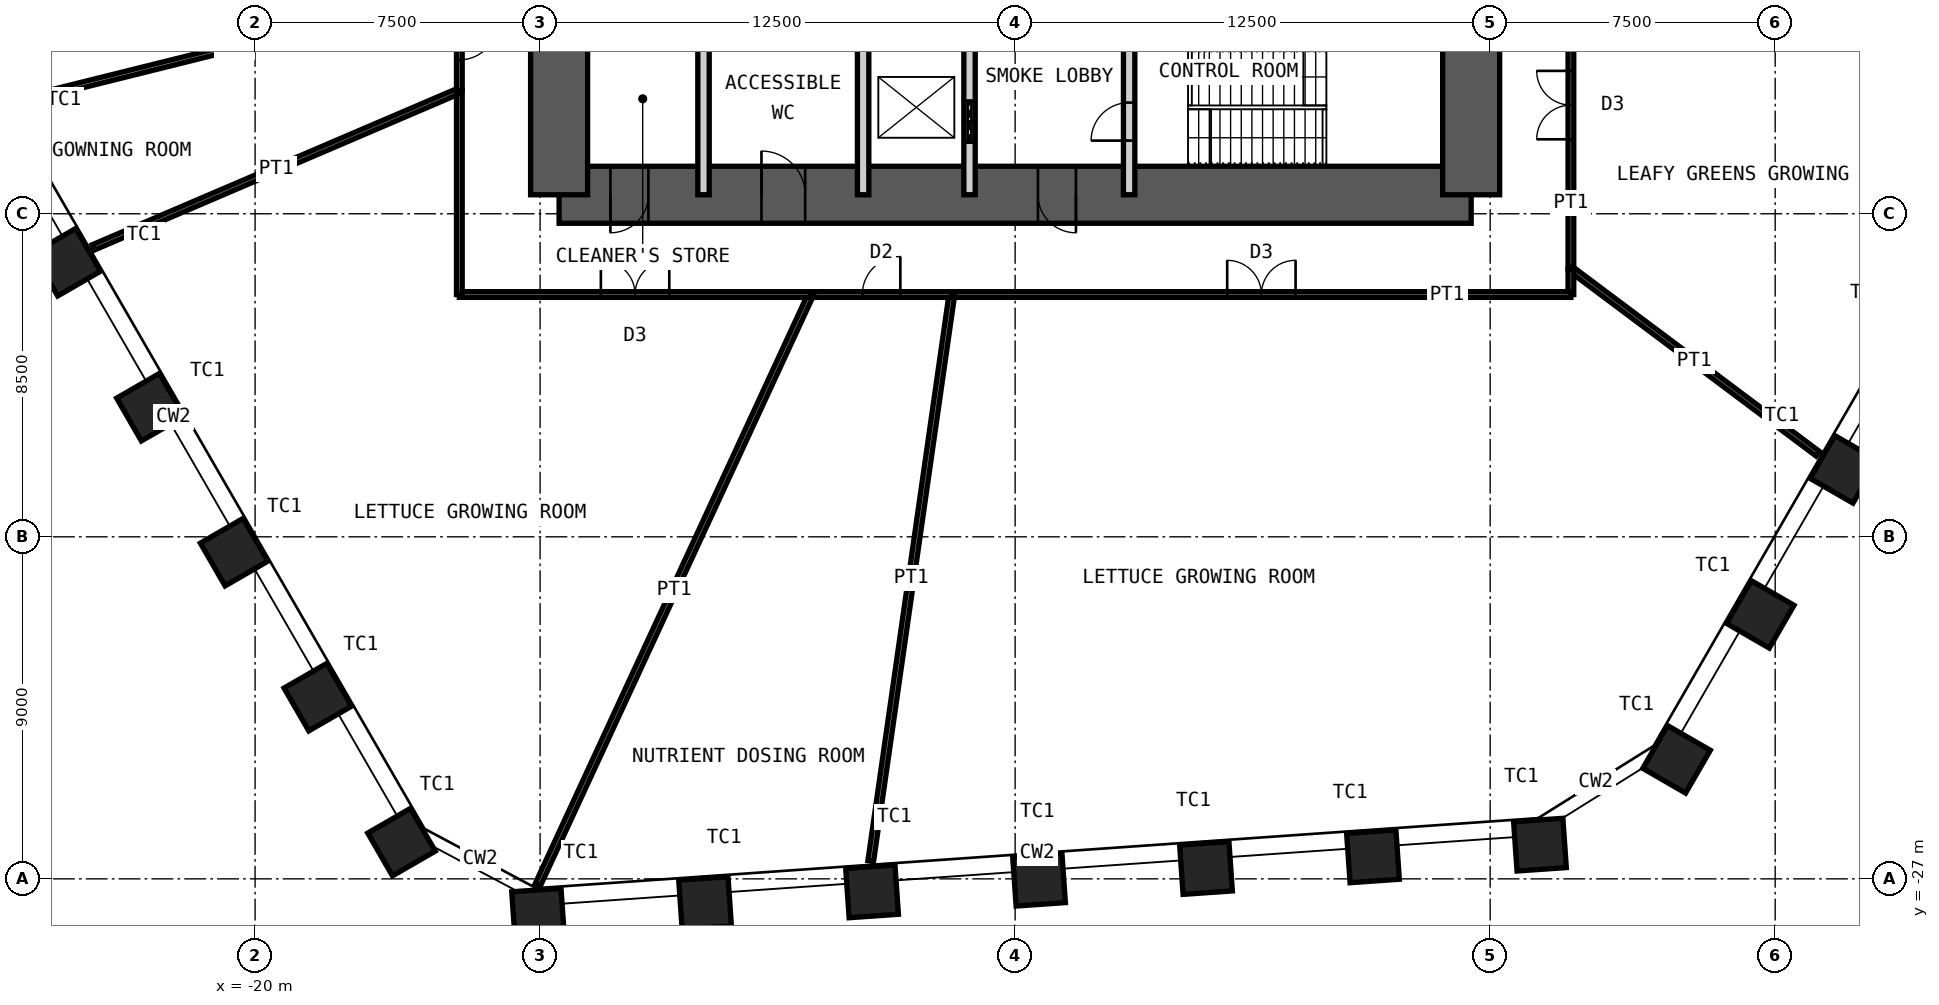
"""IFC4 building model, lengths in metres.
Left out: names, types, materials, properties, quantities, classifications, styles, units other than length and angle.
Written with IfcOpenShell. Run it as: python <this file> out.ifc"""

import sys

from ifc_helpers import new_model, si_unit, direction, frame, frame_2d, origin, origin_2d, place, context, subcontext, project, spatial, rectangle, hollow_rectangle, extrude, element, fill, save


model = new_model("IFC4")
c1 = context("Model", 3, precision=1e-05, world=origin(), true_north=direction((0.0, 1.0)))
c2 = subcontext(c1, "Body", "Model", "MODEL_VIEW")
j1 = project(units=[si_unit("LENGTHUNIT", "METRE"), si_unit("PLANEANGLEUNIT", "RADIAN")], contexts=[c1])
p1 = place(None, origin())
s1 = spatial("IfcSite", under=j1, at=p1, CompositionType="ELEMENT")
p2 = place(p1, origin())
s2 = spatial("IfcBuilding", under=s1, at=p2, CompositionType="ELEMENT")
p3 = place(p2, frame((0.0, 0.0, 42.0)))
s3 = spatial("IfcBuildingStorey", under=s2, at=p3, CompositionType="ELEMENT", Elevation=42.0)
for number, where, z_axis, x_axis in (
    (1, (21.809, -16.225, 0.0), (0.0, 0.0, 1.0), (0.5, 0.866, 0.0)),
    (2, (19.607, -20.04, 0.0), (0.0, 0.0, 1.0), (0.5, 0.866, 0.0)),
    (3, (17.405, -23.854, 0.0), (0.0, 0.0, 1.0), (0.5, 0.866, 0.0)),
    (4, (13.811, -26.1, 0.0), (0.0, 0.0, 1.0), (0.998, 0.07, 0.0)),
    (5, (9.417, -26.407, 0.0), (0.0, 0.0, 1.0), (0.998, 0.07, 0.0)),
    (6, (5.023, -26.715, 0.0), (0.0, 0.0, 1.0), (0.998, 0.07, 0.0)),
    (7, (0.629, -27.022, 0.0), (0.0, 0.0, 1.0), (0.998, 0.07, 0.0)),
    (8, (-3.765, -27.329, 0.0), (0.0, 0.0, 1.0), (0.998, 0.07, 0.0)),
    (9, (-8.159, -27.636, 0.0), (0.0, 0.0, 1.0), (0.998, 0.07, 0.0)),
    (10, (-12.553, -27.944, 0.0), (0.0, 0.0, 1.0), (0.998, 0.07, 0.0)),
    (11, (-16.147, -26.033, 0.0), (0.0, 0.0, 1.0), (0.5, -0.866, 0.0)),
    (12, (-18.349, -22.218, 0.0), (0.0, 0.0, 1.0), (0.5, -0.866, 0.0)),
    (13, (-20.552, -18.404, 0.0), (0.0, 0.0, 1.0), (0.5, -0.866, 0.0)),
    (14, (-22.754, -14.589, 0.0), (0.0, 0.0, 1.0), (0.5, -0.866, 0.0)),
    (15, (-24.956, -10.775, 0.0), (0.0, 0.0, 1.0), (0.5, -0.866, 0.0)),
):
    element("IfcColumn", number, at=place(p3, frame(where, z_axis=z_axis, x_axis=x_axis)), inside=s3, PredefinedType="COLUMN", context=c2, shape_type="SweptSolid", body=[
        extrude(hollow_rectangle(XDim=1.3, YDim=1.3, WallThickness=0.1, at=origin_2d()), origin(), (0.0, 0.0, 1.0), 5.0),
    ])
p4 = place(p3, frame((-12.0, -9.0, 0.0), z_axis=(0.0, 0.0, 1.0), x_axis=(1.0, 0.0, 0.0)))
e16 = element("IfcWall", 16, at=p4, inside=s3, PredefinedType="SHEAR", context=c2, shape_type="SweptSolid", body=[
    extrude(rectangle(XDim=24.0, YDim=1.5, at=frame_2d((12.0, 0.0))), origin(), (0.0, 0.0, 1.0), 5.0),
])
p5 = place(p4, frame((1.35, 0.0, 0.0)))
e17 = element("IfcOpeningElement", 17, at=p5, cuts=e16, PredefinedType="OPENING", context=c2, shape_type="SweptSolid", body=[
    extrude(rectangle(XDim=1.0, YDim=2.1, at=frame_2d((0.5, 1.05))), frame((0.0, 0.76, 0.0), z_axis=(0.0, -1.0, 0.0), x_axis=(1.0, 0.0, 0.0)), (0.0, 0.0, 1.0), 1.52),
])
p6 = place(p4, frame((5.325, 0.0, 0.0)))
e18 = element("IfcOpeningElement", 18, at=p6, cuts=e16, PredefinedType="OPENING", context=c2, shape_type="SweptSolid", body=[
    extrude(rectangle(XDim=1.15, YDim=2.1, at=frame_2d((0.575, 1.05))), frame((0.0, 0.76, 0.0), z_axis=(0.0, -1.0, 0.0), x_axis=(1.0, 0.0, 0.0)), (0.0, 0.0, 1.0), 1.52),
])
p7 = place(p4, frame((12.6, 0.0, 0.0)))
e19 = element("IfcOpeningElement", 19, at=p7, cuts=e16, PredefinedType="OPENING", context=c2, shape_type="SweptSolid", body=[
    extrude(rectangle(XDim=1.0, YDim=2.1, at=frame_2d((0.5, 1.05))), frame((0.0, 0.76, 0.0), z_axis=(0.0, -1.0, 0.0), x_axis=(1.0, 0.0, 0.0)), (0.0, 0.0, 1.0), 1.52),
])
p8 = place(p3, frame((12.0, -9.0, 0.0), z_axis=(0.0, 0.0, 1.0), x_axis=(0.0, 1.0, 0.0)))
e20 = element("IfcWall", 20, at=p8, inside=s3, PredefinedType="SHEAR", context=c2, shape_type="SweptSolid", body=[
    extrude(rectangle(XDim=18.0, YDim=1.5, at=frame_2d((9.0, 0.0))), origin(), (0.0, 0.0, 1.0), 5.0),
])
p9 = place(p8, frame((8.1, 0.0, 0.0)))
e21 = element("IfcOpeningElement", 21, at=p9, cuts=e20, PredefinedType="OPENING", context=c2, shape_type="SweptSolid", body=[
    extrude(rectangle(XDim=1.8, YDim=2.1, at=frame_2d((0.9, 1.05))), frame((0.0, 0.76, 0.0), z_axis=(0.0, -1.0, 0.0), x_axis=(1.0, 0.0, 0.0)), (0.0, 0.0, 1.0), 1.52),
])
p10 = place(p3, frame((-12.0, -9.0, 0.0), z_axis=(0.0, 0.0, 1.0), x_axis=(0.0, 1.0, 0.0)))
e22 = element("IfcWall", 22, at=p10, inside=s3, PredefinedType="SHEAR", context=c2, shape_type="SweptSolid", body=[
    extrude(rectangle(XDim=18.0, YDim=1.5, at=frame_2d((9.0, 0.0))), origin(), (0.0, 0.0, 1.0), 5.0),
])
p11 = place(p10, frame((8.1, 0.0, 0.0)))
e23 = element("IfcOpeningElement", 23, at=p11, cuts=e22, PredefinedType="OPENING", context=c2, shape_type="SweptSolid", body=[
    extrude(rectangle(XDim=1.8, YDim=2.1, at=frame_2d((0.9, 1.05))), frame((0.0, 0.76, 0.0), z_axis=(0.0, -1.0, 0.0), x_axis=(1.0, 0.0, 0.0)), (0.0, 0.0, 1.0), 1.52),
])
for number, where, z_axis, x_axis in (
    (24, (-8.2, -9.0, 0.0), (0.0, 0.0, 1.0), (0.0, 1.0, 0.0)),
    (25, (-4.0, -9.0, 0.0), (0.0, 0.0, 1.0), (0.0, 1.0, 0.0)),
):
    element("IfcWall", number, at=place(p3, frame(where, z_axis=z_axis, x_axis=x_axis)), inside=s3, PredefinedType="PARTITIONING", context=c2, shape_type="SweptSolid", body=[
        extrude(rectangle(XDim=3.85, YDim=0.3, at=frame_2d((1.925, 0.0))), origin(), (0.0, 0.0, 1.0), 4.78),
    ])
p12 = place(p3, frame((-1.2, -9.0, 0.0), z_axis=(0.0, 0.0, 1.0), x_axis=(0.0, 1.0, 0.0)))
e26 = element("IfcWall", 26, at=p12, inside=s3, PredefinedType="PARTITIONING", context=c2, shape_type="SweptSolid", body=[
    extrude(rectangle(XDim=3.85, YDim=0.3, at=frame_2d((1.925, 0.0))), origin(), (0.0, 0.0, 1.0), 4.78),
])
p13 = place(p12, frame((1.375, 0.0, 0.0)))
e27 = element("IfcOpeningElement", 27, at=p13, cuts=e26, PredefinedType="OPENING", context=c2, shape_type="SweptSolid", body=[
    extrude(rectangle(XDim=1.1, YDim=2.4, at=frame_2d((0.55, 1.2))), frame((0.0, 0.16, 0.0), z_axis=(0.0, -1.0, 0.0), x_axis=(1.0, 0.0, 0.0)), (0.0, 0.0, 1.0), 0.32),
])
p14 = place(p3, frame((3.0, -9.0, 0.0), z_axis=(0.0, 0.0, 1.0), x_axis=(0.0, 1.0, 0.0)))
e28 = element("IfcWall", 28, at=p14, inside=s3, PredefinedType="PARTITIONING", context=c2, shape_type="SweptSolid", body=[
    extrude(rectangle(XDim=3.85, YDim=0.3, at=frame_2d((1.925, 0.0))), origin(), (0.0, 0.0, 1.0), 4.78),
])
p15 = place(p14, frame((1.425, 0.0, 0.0)))
e29 = element("IfcOpeningElement", 29, at=p15, cuts=e28, PredefinedType="OPENING", context=c2, shape_type="SweptSolid", body=[
    extrude(rectangle(XDim=1.0, YDim=2.1, at=frame_2d((0.5, 1.05))), frame((0.0, 0.16, 0.0), z_axis=(0.0, -1.0, 0.0), x_axis=(1.0, 0.0, 0.0)), (0.0, 0.0, 1.0), 0.32),
])
p16 = place(p3, frame((14.625, -2.331, 0.0), z_axis=(0.0, 0.0, 1.0), x_axis=(0.0, -1.0, 0.0)))
e30 = element("IfcWall", 30, at=p16, inside=s3, PredefinedType="PARTITIONING", context=c2, shape_type="SweptSolid", body=[
    extrude(rectangle(XDim=8.62, YDim=0.15, at=frame_2d((4.31, 0.0))), origin(), (0.0, 0.0, 1.0), 4.8),
])
p17 = place(p16, frame((3.41, 0.0, 0.0)))
e31 = element("IfcOpeningElement", 31, at=p17, cuts=e30, PredefinedType="OPENING", context=c2, shape_type="SweptSolid", body=[
    extrude(rectangle(XDim=1.8, YDim=2.4, at=frame_2d((0.9, 1.2))), frame((0.0, 0.085, 0.0), z_axis=(0.0, -1.0, 0.0), x_axis=(1.0, 0.0, 0.0)), (0.0, 0.0, 1.0), 0.17),
])
p18 = place(p3, frame((21.123, -15.815, 0.0), z_axis=(0.0, 0.0, 1.0), x_axis=(-0.800490565123, 0.599345355492, 0.0)))
e32 = element("IfcWall", 32, at=p18, inside=s3, PredefinedType="PARTITIONING", context=c2, shape_type="SweptSolid", body=[
    extrude(rectangle(XDim=8.118, YDim=0.15, at=frame_2d((4.059, 0.0))), origin(), (0.0, 0.0, 1.0), 3.7),
])
p19 = place(p3, frame((14.625, -10.95, 0.0), z_axis=(0.0, 0.0, 1.0), x_axis=(0.0, -1.0, 0.0)))
e33 = element("IfcWall", 33, at=p19, inside=s3, PredefinedType="PARTITIONING", context=c2, shape_type="SweptSolid", body=[
    extrude(rectangle(XDim=0.675, YDim=0.15, at=frame_2d((0.337, 0.0))), origin(), (0.0, 0.0, 1.0), 4.8),
])
p20 = place(p3, frame((14.625, -11.625, 0.0), z_axis=(0.0, 0.0, 1.0), x_axis=(-1.0, 0.0, 0.0)))
e34 = element("IfcWall", 34, at=p20, inside=s3, PredefinedType="PARTITIONING", context=c2, shape_type="SweptSolid", body=[
    extrude(rectangle(XDim=16.29, YDim=0.15, at=frame_2d((8.145, 0.0))), origin(), (0.0, 0.0, 1.0), 4.8),
])
p21 = place(p20, frame((7.245, 0.0, 0.0)))
e35 = element("IfcOpeningElement", 35, at=p21, cuts=e34, PredefinedType="OPENING", context=c2, shape_type="SweptSolid", body=[
    extrude(rectangle(XDim=1.8, YDim=2.4, at=frame_2d((0.9, 1.2))), frame((0.0, 0.085, 0.0), z_axis=(0.0, -1.0, 0.0), x_axis=(1.0, 0.0, 0.0)), (0.0, 0.0, 1.0), 0.17),
])
p22 = place(p3, frame((-3.8, -26.532, 0.0), z_axis=(0.0, 0.0, 1.0), x_axis=(0.14177542097, 0.989898848372, 0.0)))
e36 = element("IfcWall", 36, at=p22, inside=s3, PredefinedType="PARTITIONING", context=c2, shape_type="SweptSolid", body=[
    extrude(rectangle(XDim=15.059, YDim=0.15, at=frame_2d((7.53, 0.0))), origin(), (0.0, 0.0, 1.0), 3.7),
])
p23 = place(p3, frame((-1.665, -11.625, 0.0), z_axis=(0.0, 0.0, 1.0), x_axis=(-1.0, 0.0, 0.0)))
e37 = element("IfcWall", 37, at=p23, inside=s3, PredefinedType="PARTITIONING", context=c2, shape_type="SweptSolid", body=[
    extrude(rectangle(XDim=3.712, YDim=0.15, at=frame_2d((1.856, 0.0))), origin(), (0.0, 0.0, 1.0), 4.8),
])
p24 = place(p23, frame((1.356, 0.0, 0.0)))
e38 = element("IfcOpeningElement", 38, at=p24, cuts=e37, PredefinedType="OPENING", context=c2, shape_type="SweptSolid", body=[
    extrude(rectangle(XDim=1.0, YDim=2.4, at=frame_2d((0.5, 1.2))), frame((0.0, 0.085, 0.0), z_axis=(0.0, -1.0, 0.0), x_axis=(1.0, 0.0, 0.0)), (0.0, 0.0, 1.0), 0.17),
])
p25 = place(p3, frame((-12.56, -27.155, 0.0), z_axis=(0.0, 0.0, 1.0), x_axis=(0.419799104875, 0.907617051154, 0.0)))
e39 = element("IfcWall", 39, at=p25, inside=s3, PredefinedType="PARTITIONING", context=c2, shape_type="SweptSolid", body=[
    extrude(rectangle(XDim=17.11, YDim=0.15, at=frame_2d((8.555, 0.0))), origin(), (0.0, 0.0, 1.0), 3.7),
])
p26 = place(p3, frame((-5.377, -11.625, 0.0), z_axis=(0.0, 0.0, 1.0), x_axis=(-1.0, 0.0, 0.0)))
e40 = element("IfcWall", 40, at=p26, inside=s3, PredefinedType="PARTITIONING", context=c2, shape_type="SweptSolid", body=[
    extrude(rectangle(XDim=9.248, YDim=0.15, at=frame_2d((4.624, 0.0))), origin(), (0.0, 0.0, 1.0), 4.8),
])
p27 = place(p26, frame((3.724, 0.0, 0.0)))
e41 = element("IfcOpeningElement", 41, at=p27, cuts=e40, PredefinedType="OPENING", context=c2, shape_type="SweptSolid", body=[
    extrude(rectangle(XDim=1.8, YDim=2.4, at=frame_2d((0.9, 1.2))), frame((0.0, 0.085, 0.0), z_axis=(0.0, -1.0, 0.0), x_axis=(1.0, 0.0, 0.0)), (0.0, 0.0, 1.0), 0.17),
])
p28 = place(p3, frame((-14.625, -11.625, 0.0), z_axis=(0.0, 0.0, 1.0), x_axis=(0.0, 1.0, 0.0)))
e42 = element("IfcWall", 42, at=p28, inside=s3, PredefinedType="PARTITIONING", context=c2, shape_type="SweptSolid", body=[
    extrude(rectangle(XDim=5.364, YDim=0.15, at=frame_2d((2.682, 0.0))), origin(), (0.0, 0.0, 1.0), 4.8),
])
p29 = place(p3, frame((-24.258, -10.385, 0.0), z_axis=(0.0, 0.0, 1.0), x_axis=(0.919298009201, 0.393562155547, 0.0)))
e43 = element("IfcWall", 43, at=p29, inside=s3, PredefinedType="PARTITIONING", context=c2, shape_type="SweptSolid", body=[
    extrude(rectangle(XDim=10.479, YDim=0.15, at=frame_2d((5.239, 0.0))), origin(), (0.0, 0.0, 1.0), 3.7),
])
p30 = place(p3, frame((-14.625, -6.261, 0.0), z_axis=(0.0, 0.0, 1.0), x_axis=(0.0, 1.0, 0.0)))
e44 = element("IfcWall", 44, at=p30, inside=s3, PredefinedType="PARTITIONING", context=c2, shape_type="SweptSolid", body=[
    extrude(rectangle(XDim=2.62, YDim=0.15, at=frame_2d((1.31, 0.0))), origin(), (0.0, 0.0, 1.0), 4.8),
])
p31 = place(p30, frame((0.81, 0.0, 0.0)))
e45 = element("IfcOpeningElement", 45, at=p31, cuts=e44, PredefinedType="OPENING", context=c2, shape_type="SweptSolid", body=[
    extrude(rectangle(XDim=1.0, YDim=2.4, at=frame_2d((0.5, 1.2))), frame((0.0, 0.085, 0.0), z_axis=(0.0, -1.0, 0.0), x_axis=(1.0, 0.0, 0.0)), (0.0, 0.0, 1.0), 0.17),
])
p32 = place(p3, frame((-26.455, -6.586, 0.0), z_axis=(0.0, 0.0, 1.0), x_axis=(0.970383505188, 0.241569561118, 0.0)))
e46 = element("IfcWall", 46, at=p32, inside=s3, PredefinedType="PARTITIONING", context=c2, shape_type="SweptSolid", body=[
    extrude(rectangle(XDim=12.191, YDim=0.15, at=frame_2d((6.096, 0.0))), origin(), (0.0, 0.0, 1.0), 3.7),
])
p33 = place(p5, origin())
e47 = element("IfcDoor", 47, at=p33, inside=s3, OperationType="SINGLE_SWING_LEFT", PredefinedType="DOOR", context=c2, shape_type="SweptSolid", body=[
    extrude(rectangle(XDim=1.0, YDim=2.1, at=frame_2d((0.5, 1.05))), frame((0.0, 0.025, 0.0), z_axis=(0.0, -1.0, 0.0), x_axis=(1.0, 0.0, 0.0)), (0.0, 0.0, 1.0), 0.05),
])
fill(e17, e47)
p34 = place(p6, origin())
e48 = element("IfcDoor", 48, at=p34, inside=s3, OperationType="SINGLE_SWING_RIGHT", PredefinedType="DOOR", context=c2, shape_type="SweptSolid", body=[
    extrude(rectangle(XDim=1.15, YDim=2.1, at=frame_2d((0.575, 1.05))), frame((0.0, 0.025, 0.0), z_axis=(0.0, -1.0, 0.0), x_axis=(1.0, 0.0, 0.0)), (0.0, 0.0, 1.0), 0.05),
])
fill(e18, e48)
p35 = place(p7, origin())
e49 = element("IfcDoor", 49, at=p35, inside=s3, OperationType="SINGLE_SWING_RIGHT", PredefinedType="DOOR", context=c2, shape_type="SweptSolid", body=[
    extrude(rectangle(XDim=1.0, YDim=2.1, at=frame_2d((0.5, 1.05))), frame((0.0, 0.025, 0.0), z_axis=(0.0, -1.0, 0.0), x_axis=(1.0, 0.0, 0.0)), (0.0, 0.0, 1.0), 0.05),
])
fill(e19, e49)
p36 = place(p15, origin())
e50 = element("IfcDoor", 50, at=p36, inside=s3, OperationType="SINGLE_SWING_RIGHT", PredefinedType="DOOR", context=c2, shape_type="SweptSolid", body=[
    extrude(rectangle(XDim=1.0, YDim=2.1, at=frame_2d((0.5, 1.05))), frame((0.0, 0.025, 0.0), z_axis=(0.0, -1.0, 0.0), x_axis=(1.0, 0.0, 0.0)), (0.0, 0.0, 1.0), 0.05),
])
fill(e29, e50)
p37 = place(p13, origin())
e51 = element("IfcDoor", 51, at=p37, inside=s3, OperationType="DOUBLE_DOOR_SLIDING", PredefinedType="DOOR", context=c2, shape_type="SweptSolid", body=[
    extrude(rectangle(XDim=1.1, YDim=2.4, at=frame_2d((0.55, 1.2))), frame((0.0, 0.025, 0.0), z_axis=(0.0, -1.0, 0.0), x_axis=(1.0, 0.0, 0.0)), (0.0, 0.0, 1.0), 0.05),
])
fill(e27, e51)
p38 = place(p17, origin())
e52 = element("IfcDoor", 52, at=p38, inside=s3, OperationType="DOUBLE_DOOR_DOUBLE_SWING", PredefinedType="DOOR", context=c2, shape_type="SweptSolid", body=[
    extrude(rectangle(XDim=1.8, YDim=2.4, at=frame_2d((0.9, 1.2))), frame((0.0, 0.025, 0.0), z_axis=(0.0, -1.0, 0.0), x_axis=(1.0, 0.0, 0.0)), (0.0, 0.0, 1.0), 0.05),
])
fill(e31, e52)
p39 = place(p21, origin())
e53 = element("IfcDoor", 53, at=p39, inside=s3, OperationType="DOUBLE_DOOR_DOUBLE_SWING", PredefinedType="DOOR", context=c2, shape_type="SweptSolid", body=[
    extrude(rectangle(XDim=1.8, YDim=2.4, at=frame_2d((0.9, 1.2))), frame((0.0, 0.025, 0.0), z_axis=(0.0, -1.0, 0.0), x_axis=(1.0, 0.0, 0.0)), (0.0, 0.0, 1.0), 0.05),
])
fill(e35, e53)
p40 = place(p24, origin())
e54 = element("IfcDoor", 54, at=p40, inside=s3, OperationType="SINGLE_SWING_LEFT", PredefinedType="DOOR", context=c2, shape_type="SweptSolid", body=[
    extrude(rectangle(XDim=1.0, YDim=2.4, at=frame_2d((0.5, 1.2))), frame((0.0, 0.025, 0.0), z_axis=(0.0, -1.0, 0.0), x_axis=(1.0, 0.0, 0.0)), (0.0, 0.0, 1.0), 0.05),
])
fill(e38, e54)
p41 = place(p27, origin())
e55 = element("IfcDoor", 55, at=p41, inside=s3, OperationType="DOUBLE_DOOR_DOUBLE_SWING", PredefinedType="DOOR", context=c2, shape_type="SweptSolid", body=[
    extrude(rectangle(XDim=1.8, YDim=2.4, at=frame_2d((0.9, 1.2))), frame((0.0, 0.025, 0.0), z_axis=(0.0, -1.0, 0.0), x_axis=(1.0, 0.0, 0.0)), (0.0, 0.0, 1.0), 0.05),
])
fill(e41, e55)
p42 = place(p31, origin())
e56 = element("IfcDoor", 56, at=p42, inside=s3, OperationType="SINGLE_SWING_RIGHT", PredefinedType="DOOR", context=c2, shape_type="SweptSolid", body=[
    extrude(rectangle(XDim=1.0, YDim=2.4, at=frame_2d((0.5, 1.2))), frame((0.0, 0.025, 0.0), z_axis=(0.0, -1.0, 0.0), x_axis=(1.0, 0.0, 0.0)), (0.0, 0.0, 1.0), 0.05),
])
fill(e45, e56)
save(model, sys.argv[1])
